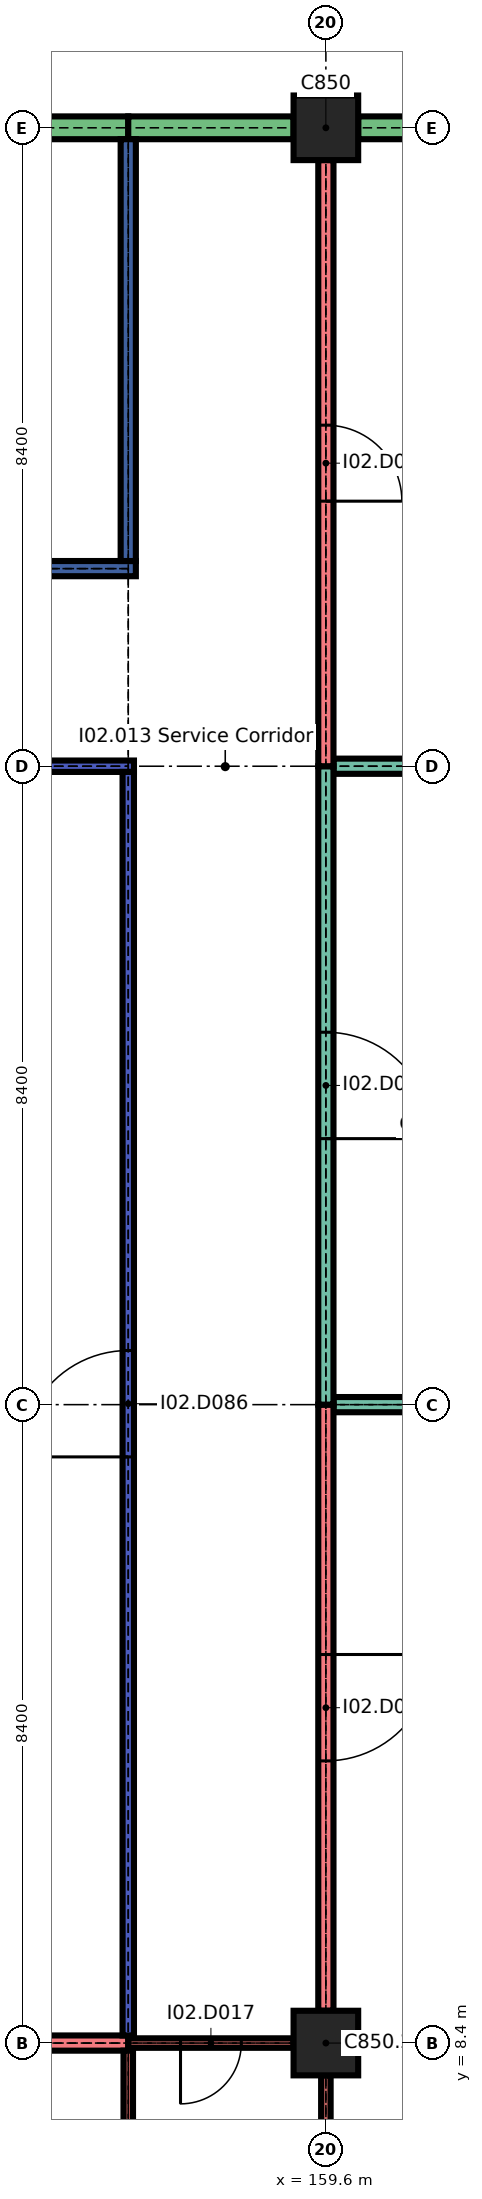
"""IFC4 building model, lengths in metres.
Left out: names, types, materials, properties, quantities, classifications, styles, units other than length and angle.
Written with IfcOpenShell. Run it as: python <this file> out.ifc"""

import sys

from ifc_helpers import new_model, si_unit, direction, frame, frame_2d, origin, origin_2d, place, context, subcontext, project, spatial, rectangle, extrude, element, fill, save


model = new_model("IFC4")
c1 = context("Model", 3, precision=1e-05, world=origin(), true_north=direction((0.0, 1.0)))
c2 = subcontext(c1, "Body", "Model", "MODEL_VIEW")
j1 = project(units=[si_unit("LENGTHUNIT", "METRE"), si_unit("PLANEANGLEUNIT", "RADIAN")], contexts=[c1])
p1 = place(None, origin())
s1 = spatial("IfcSite", under=j1, at=p1, CompositionType="ELEMENT")
p2 = place(p1, origin())
s2 = spatial("IfcBuilding", under=s1, at=p2, CompositionType="ELEMENT")
p3 = place(p2, frame((0.0, 0.0, 12.9)))
s3 = spatial("IfcBuildingStorey", under=s2, at=p3, CompositionType="ELEMENT", Elevation=12.9)
for number, where, z_axis, x_axis in (
    (1, (159.6, 8.4, 0.0), (0.0, 0.0, 1.0), (1.0, 0.0, 0.0)),
    (2, (159.6, 33.6, 0.0), (0.0, 0.0, 1.0), (1.0, 0.0, 0.0)),
):
    element("IfcColumn", number, at=place(p3, frame(where, z_axis=z_axis, x_axis=x_axis)), inside=s3, PredefinedType="COLUMN", context=c2, shape_type="SweptSolid", body=[
        extrude(rectangle(XDim=0.85, YDim=0.85, at=origin_2d()), origin(), (0.0, 0.0, 1.0), 2.04),
    ])
p4 = place(p3, frame((151.625, 33.6, 0.0), z_axis=(0.0, 0.0, 1.0), x_axis=(1.0, 0.0, 0.0)))
e3 = element("IfcWall", 3, at=p4, inside=s3, PredefinedType="SOLIDWALL", context=c2, shape_type="SweptSolid", body=[
    extrude(rectangle(XDim=5.375, YDim=0.3, at=frame_2d((2.688, 0.0))), origin(), (0.0, 0.0, 1.0), 1.74),
])
p5 = place(p4, frame((0.625, 0.0, 0.6)))
e4 = element("IfcOpeningElement", 4, at=p5, cuts=e3, PredefinedType="OPENING", context=c2, shape_type="SweptSolid", body=[
    extrude(rectangle(XDim=2.1, YDim=1.05, at=frame_2d((1.05, 0.525))), frame((0.0, 0.16, 0.0), z_axis=(0.0, -1.0, 0.0), x_axis=(1.0, 0.0, 0.0)), (0.0, 0.0, 1.0), 0.32),
])
p6 = place(p3, frame((157.0, 33.6, 0.0), z_axis=(0.0, 0.0, 1.0), x_axis=(1.0, 0.0, 0.0)))
e5 = element("IfcWall", 5, at=p6, inside=s3, PredefinedType="SOLIDWALL", context=c2, shape_type="SweptSolid", body=[
    extrude(rectangle(XDim=2.175, YDim=0.3, at=frame_2d((1.087, 0.0))), origin(), (0.0, 0.0, 1.0), 1.74),
])
p7 = place(p3, frame((160.025, 33.6, 0.0), z_axis=(0.0, 0.0, 1.0), x_axis=(1.0, 0.0, 0.0)))
e6 = element("IfcWall", 6, at=p7, inside=s3, PredefinedType="SOLIDWALL", context=c2, shape_type="SweptSolid", body=[
    extrude(rectangle(XDim=7.55, YDim=0.3, at=frame_2d((3.775, 0.0))), origin(), (0.0, 0.0, 1.0), 1.74),
])
p8 = place(p7, frame((0.625, 0.0, 0.6)))
e7 = element("IfcOpeningElement", 7, at=p8, cuts=e6, PredefinedType="OPENING", context=c2, shape_type="SweptSolid", body=[
    extrude(rectangle(XDim=2.1, YDim=1.05, at=frame_2d((1.05, 0.525))), frame((0.0, 0.16, 0.0), z_axis=(0.0, -1.0, 0.0), x_axis=(1.0, 0.0, 0.0)), (0.0, 0.0, 1.0), 0.32),
])
p9 = place(p7, frame((4.825, 0.0, 0.6)))
e8 = element("IfcOpeningElement", 8, at=p9, cuts=e6, PredefinedType="OPENING", context=c2, shape_type="SweptSolid", body=[
    extrude(rectangle(XDim=2.1, YDim=1.05, at=frame_2d((1.05, 0.525))), frame((0.0, 0.16, 0.0), z_axis=(0.0, -1.0, 0.0), x_axis=(1.0, 0.0, 0.0)), (0.0, 0.0, 1.0), 0.32),
])
p10 = place(p3, frame((151.625, 8.4, 0.0), z_axis=(0.0, 0.0, 1.0), x_axis=(1.0, 0.0, 0.0)))
e9 = element("IfcWall", 9, at=p10, inside=s3, PredefinedType="SOLIDWALL", context=c2, shape_type="SweptSolid", body=[
    extrude(rectangle(XDim=5.375, YDim=0.2, at=frame_2d((2.688, 0.0))), origin(), (0.0, 0.0, 1.0), 2.04),
])
p11 = place(p3, frame((157.0, 8.4, 0.0), z_axis=(0.0, 0.0, 1.0), x_axis=(1.0, 0.0, 0.0)))
e10 = element("IfcWall", 10, at=p11, inside=s3, PredefinedType="SOLIDWALL", context=c2, shape_type="SweptSolid", body=[
    extrude(rectangle(XDim=2.175, YDim=0.125, at=frame_2d((1.087, 0.0))), origin(), (0.0, 0.0, 1.0), 2.04),
])
p12 = place(p11, frame((0.688, 0.0, 0.0)))
e11 = element("IfcOpeningElement", 11, at=p12, cuts=e10, PredefinedType="OPENING", context=c2, shape_type="SweptSolid", body=[
    extrude(rectangle(XDim=0.8, YDim=2.0, at=frame_2d((0.4, 1.0))), frame((0.0, 0.073, 0.0), z_axis=(0.0, -1.0, 0.0), x_axis=(1.0, 0.0, 0.0)), (0.0, 0.0, 1.0), 0.145),
])
p13 = place(p3, frame((159.7, 16.8, 0.0), z_axis=(0.0, 0.0, 1.0), x_axis=(1.0, 0.0, 0.0)))
e12 = element("IfcWall", 12, at=p13, inside=s3, PredefinedType="PARTITIONING", context=c2, shape_type="SweptSolid", body=[
    extrude(rectangle(XDim=4.7, YDim=0.2, at=frame_2d((2.35, 0.0))), origin(), (0.0, 0.0, 1.0), 2.04),
])
p14 = place(p3, frame((151.625, 25.2, 0.0), z_axis=(0.0, 0.0, 1.0), x_axis=(1.0, 0.0, 0.0)))
e13 = element("IfcWall", 13, at=p14, inside=s3, PredefinedType="PARTITIONING", context=c2, shape_type="SweptSolid", body=[
    extrude(rectangle(XDim=5.45, YDim=0.15, at=frame_2d((2.725, 0.0))), origin(), (0.0, 0.0, 1.0), 2.04),
])
p15 = place(p3, frame((159.7, 25.2, 0.0), z_axis=(0.0, 0.0, 1.0), x_axis=(1.0, 0.0, 0.0)))
e14 = element("IfcWall", 14, at=p15, inside=s3, PredefinedType="PARTITIONING", context=c2, shape_type="SweptSolid", body=[
    extrude(rectangle(XDim=4.7, YDim=0.2, at=frame_2d((2.35, 0.0))), origin(), (0.0, 0.0, 1.0), 2.04),
])
p16 = place(p3, frame((117.7, 27.8, 0.0), z_axis=(0.0, 0.0, 1.0), x_axis=(1.0, 0.0, 0.0)))
e15 = element("IfcWall", 15, at=p16, inside=s3, PredefinedType="SOLIDWALL", context=c2, shape_type="SweptSolid", body=[
    extrude(rectangle(XDim=39.4, YDim=0.2, at=frame_2d((19.7, 0.0))), origin(), (0.0, 0.0, 1.0), 2.1),
])
p17 = place(p16, frame((5.55, 0.0, 0.0)))
e16 = element("IfcOpeningElement", 16, at=p17, cuts=e15, PredefinedType="OPENING", context=c2, shape_type="SweptSolid", body=[
    extrude(rectangle(XDim=1.4, YDim=2.0, at=frame_2d((0.7, 1.0))), frame((0.0, 0.11, 0.0), z_axis=(0.0, -1.0, 0.0), x_axis=(1.0, 0.0, 0.0)), (0.0, 0.0, 1.0), 0.22),
])
p18 = place(p16, frame((16.2, 0.0, 0.0)))
e17 = element("IfcOpeningElement", 17, at=p18, cuts=e15, PredefinedType="OPENING", context=c2, shape_type="SweptSolid", body=[
    extrude(rectangle(XDim=1.0, YDim=2.0, at=frame_2d((0.5, 1.0))), frame((0.0, 0.11, 0.0), z_axis=(0.0, -1.0, 0.0), x_axis=(1.0, 0.0, 0.0)), (0.0, 0.0, 1.0), 0.22),
])
p19 = place(p16, frame((22.5, 0.0, 0.0)))
e18 = element("IfcOpeningElement", 18, at=p19, cuts=e15, PredefinedType="OPENING", context=c2, shape_type="SweptSolid", body=[
    extrude(rectangle(XDim=1.0, YDim=2.0, at=frame_2d((0.5, 1.0))), frame((0.0, 0.11, 0.0), z_axis=(0.0, -1.0, 0.0), x_axis=(1.0, 0.0, 0.0)), (0.0, 0.0, 1.0), 0.22),
])
p20 = place(p16, frame((28.1, 0.0, 0.0)))
e19 = element("IfcOpeningElement", 19, at=p20, cuts=e15, PredefinedType="OPENING", context=c2, shape_type="SweptSolid", body=[
    extrude(rectangle(XDim=1.0, YDim=2.0, at=frame_2d((0.5, 1.0))), frame((0.0, 0.11, 0.0), z_axis=(0.0, -1.0, 0.0), x_axis=(1.0, 0.0, 0.0)), (0.0, 0.0, 1.0), 0.22),
])
p21 = place(p16, frame((35.2, 0.0, 0.0)))
e20 = element("IfcOpeningElement", 20, at=p21, cuts=e15, PredefinedType="OPENING", context=c2, shape_type="SweptSolid", body=[
    extrude(rectangle(XDim=1.0, YDim=2.0, at=frame_2d((0.5, 1.0))), frame((0.0, 0.11, 0.0), z_axis=(0.0, -1.0, 0.0), x_axis=(1.0, 0.0, 0.0)), (0.0, 0.0, 1.0), 0.22),
])
p22 = place(p3, frame((157.0, 0.15, 0.0), z_axis=(0.0, 0.0, 1.0), x_axis=(0.0, 1.0, 0.0)))
e21 = element("IfcWall", 21, at=p22, inside=s3, PredefinedType="SOLIDWALL", context=c2, shape_type="SweptSolid", body=[
    extrude(rectangle(XDim=8.15, YDim=0.125, at=frame_2d((4.075, 0.0))), origin(), (0.0, 0.0, 1.0), 2.04),
])
p23 = place(p3, frame((157.0, 8.5, 0.0), z_axis=(0.0, 0.0, 1.0), x_axis=(0.0, 1.0, 0.0)))
e22 = element("IfcWall", 22, at=p23, inside=s3, PredefinedType="PARTITIONING", context=c2, shape_type="SweptSolid", body=[
    extrude(rectangle(XDim=16.625, YDim=0.15, at=frame_2d((8.312, 0.0))), origin(), (0.0, 0.0, 1.0), 2.04),
])
p24 = place(p23, frame((7.613, 0.0, 0.0)))
e23 = element("IfcOpeningElement", 23, at=p24, cuts=e22, PredefinedType="OPENING", context=c2, shape_type="SweptSolid", body=[
    extrude(rectangle(XDim=1.4, YDim=2.0, at=frame_2d((0.7, 1.0))), frame((0.0, 0.085, 0.0), z_axis=(0.0, -1.0, 0.0), x_axis=(1.0, 0.0, 0.0)), (0.0, 0.0, 1.0), 0.17),
])
p25 = place(p3, frame((157.0, 27.9, 0.0), z_axis=(0.0, 0.0, 1.0), x_axis=(0.0, 1.0, 0.0)))
e24 = element("IfcWall", 24, at=p25, inside=s3, PredefinedType="SOLIDWALL", context=c2, shape_type="SweptSolid", body=[
    extrude(rectangle(XDim=5.55, YDim=0.2, at=frame_2d((2.775, 0.0))), origin(), (0.0, 0.0, 1.0), 2.1),
])
p26 = place(p3, frame((159.6, 0.425, 0.0), z_axis=(0.0, 0.0, 1.0), x_axis=(0.0, 1.0, 0.0)))
e25 = element("IfcWall", 25, at=p26, inside=s3, PredefinedType="SOLIDWALL", context=c2, shape_type="SweptSolid", body=[
    extrude(rectangle(XDim=7.55, YDim=0.125, at=frame_2d((3.775, 0.0))), origin(), (0.0, 0.0, 1.0), 2.04),
])
p27 = place(p3, frame((159.6, 8.825, 0.0), z_axis=(0.0, 0.0, 1.0), x_axis=(0.0, 1.0, 0.0)))
e26 = element("IfcWall", 26, at=p27, inside=s3, PredefinedType="SOLIDWALL", context=c2, shape_type="SweptSolid", body=[
    extrude(rectangle(XDim=7.975, YDim=0.2, at=frame_2d((3.988, 0.0))), origin(), (0.0, 0.0, 1.0), 2.04),
])
p28 = place(p27, frame((3.288, 0.0, 0.0)))
e27 = element("IfcOpeningElement", 27, at=p28, cuts=e26, PredefinedType="OPENING", context=c2, shape_type="SweptSolid", body=[
    extrude(rectangle(XDim=1.4, YDim=2.0, at=frame_2d((0.7, 1.0))), frame((0.0, 0.11, 0.0), z_axis=(0.0, -1.0, 0.0), x_axis=(1.0, 0.0, 0.0)), (0.0, 0.0, 1.0), 0.22),
])
p29 = place(p3, frame((159.6, 16.8, 0.0), z_axis=(0.0, 0.0, 1.0), x_axis=(0.0, 1.0, 0.0)))
e28 = element("IfcWall", 28, at=p29, inside=s3, PredefinedType="PARTITIONING", context=c2, shape_type="SweptSolid", body=[
    extrude(rectangle(XDim=8.4, YDim=0.2, at=frame_2d((4.2, 0.0))), origin(), (0.0, 0.0, 1.0), 2.04),
])
p30 = place(p29, frame((3.5, 0.0, 0.0)))
e29 = element("IfcOpeningElement", 29, at=p30, cuts=e28, PredefinedType="OPENING", context=c2, shape_type="SweptSolid", body=[
    extrude(rectangle(XDim=1.4, YDim=2.0, at=frame_2d((0.7, 1.0))), frame((0.0, 0.11, 0.0), z_axis=(0.0, -1.0, 0.0), x_axis=(1.0, 0.0, 0.0)), (0.0, 0.0, 1.0), 0.22),
])
p31 = place(p3, frame((159.6, 25.2, 0.0), z_axis=(0.0, 0.0, 1.0), x_axis=(0.0, 1.0, 0.0)))
e30 = element("IfcWall", 30, at=p31, inside=s3, PredefinedType="SOLIDWALL", context=c2, shape_type="SweptSolid", body=[
    extrude(rectangle(XDim=7.975, YDim=0.2, at=frame_2d((3.988, 0.0))), origin(), (0.0, 0.0, 1.0), 2.04),
])
p32 = place(p31, frame((3.488, 0.0, 0.0)))
e31 = element("IfcOpeningElement", 31, at=p32, cuts=e30, PredefinedType="OPENING", context=c2, shape_type="SweptSolid", body=[
    extrude(rectangle(XDim=1.0, YDim=2.0, at=frame_2d((0.5, 1.0))), frame((0.0, 0.11, 0.0), z_axis=(0.0, -1.0, 0.0), x_axis=(1.0, 0.0, 0.0)), (0.0, 0.0, 1.0), 0.22),
])
p33 = place(p12, origin())
e32 = element("IfcDoor", 32, at=p33, inside=s3, OperationType="SINGLE_SWING_LEFT", PredefinedType="DOOR", context=c2, shape_type="SweptSolid", body=[
    extrude(rectangle(XDim=0.8, YDim=2.0, at=frame_2d((0.4, 1.0))), frame((0.0, 0.03, 0.0), z_axis=(0.0, -1.0, 0.0), x_axis=(1.0, 0.0, 0.0)), (0.0, 0.0, 1.0), 0.06),
])
fill(e11, e32)
p34 = place(p24, origin())
e33 = element("IfcDoor", 33, at=p34, inside=s3, OperationType="SINGLE_SWING_RIGHT", PredefinedType="DOOR", context=c2, shape_type="SweptSolid", body=[
    extrude(rectangle(XDim=1.4, YDim=2.0, at=frame_2d((0.7, 1.0))), frame((0.0, 0.025, 0.0), z_axis=(0.0, -1.0, 0.0), x_axis=(1.0, 0.0, 0.0)), (0.0, 0.0, 1.0), 0.05),
])
fill(e23, e33)
p35 = place(p28, origin())
e34 = element("IfcDoor", 34, at=p35, inside=s3, OperationType="SINGLE_SWING_RIGHT", PredefinedType="DOOR", context=c2, shape_type="SweptSolid", body=[
    extrude(rectangle(XDim=1.4, YDim=2.0, at=frame_2d((0.7, 1.0))), frame((0.0, 0.025, 0.0), z_axis=(0.0, -1.0, 0.0), x_axis=(1.0, 0.0, 0.0)), (0.0, 0.0, 1.0), 0.05),
])
fill(e27, e34)
p36 = place(p30, origin())
e35 = element("IfcDoor", 35, at=p36, inside=s3, OperationType="SINGLE_SWING_LEFT", PredefinedType="DOOR", context=c2, shape_type="SweptSolid", body=[
    extrude(rectangle(XDim=1.4, YDim=2.0, at=frame_2d((0.7, 1.0))), frame((0.0, 0.03, 0.0), z_axis=(0.0, -1.0, 0.0), x_axis=(1.0, 0.0, 0.0)), (0.0, 0.0, 1.0), 0.06),
])
fill(e29, e35)
p37 = place(p32, origin())
e36 = element("IfcDoor", 36, at=p37, inside=s3, OperationType="SINGLE_SWING_LEFT", PredefinedType="DOOR", context=c2, shape_type="SweptSolid", body=[
    extrude(rectangle(XDim=1.0, YDim=2.0, at=frame_2d((0.5, 1.0))), frame((0.0, 0.025, 0.0), z_axis=(0.0, -1.0, 0.0), x_axis=(1.0, 0.0, 0.0)), (0.0, 0.0, 1.0), 0.05),
])
fill(e31, e36)
save(model, sys.argv[1])
